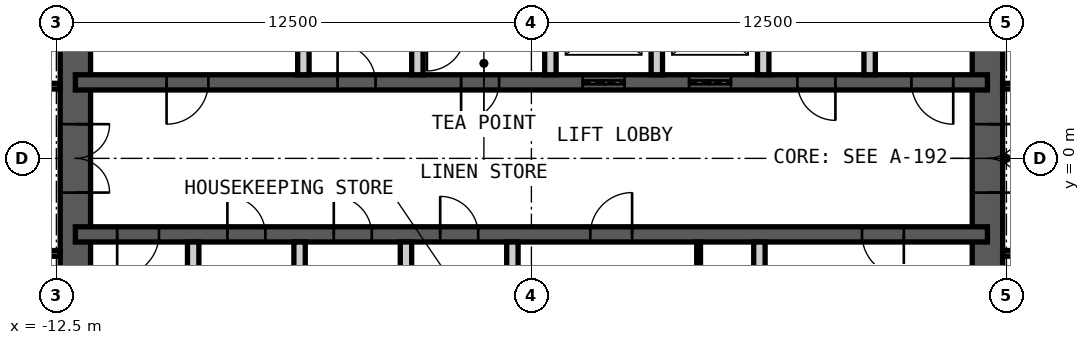
"""IFC4 building model, lengths in metres.
Left out: names, types, materials, properties, quantities, classifications, styles, units other than length and angle.
Written with IfcOpenShell. Run it as: python <this file> out.ifc"""

import sys

from ifc_helpers import new_model, si_unit, direction, frame, frame_2d, origin, place, context, subcontext, project, spatial, rectangle, extrude, element, fill, save


model = new_model("IFC4")
c1 = context("Model", 3, precision=1e-05, world=origin(), true_north=direction((0.0, 1.0)))
c2 = subcontext(c1, "Body", "Model", "MODEL_VIEW")
j1 = project(units=[si_unit("LENGTHUNIT", "METRE"), si_unit("PLANEANGLEUNIT", "RADIAN")], contexts=[c1])
p1 = place(None, origin())
s1 = spatial("IfcSite", under=j1, at=p1, CompositionType="ELEMENT")
p2 = place(p1, origin())
s2 = spatial("IfcBuilding", under=s1, at=p2, CompositionType="ELEMENT")
p3 = place(p2, frame((0.0, 0.0, 304.0)))
s3 = spatial("IfcBuildingStorey", under=s2, at=p3, CompositionType="ELEMENT", Elevation=304.0)
p4 = place(p3, frame((12.0, -9.0, 0.0), z_axis=(0.0, 0.0, 1.0), x_axis=(0.0, 1.0, 0.0)))
e1 = element("IfcWall", 1, at=p4, inside=s3, PredefinedType="SHEAR", context=c2, shape_type="SweptSolid", body=[
    extrude(rectangle(XDim=18.0, YDim=0.8, at=frame_2d((9.0, 0.0))), origin(), (0.0, 0.0, 1.0), 4.2),
])
p5 = place(p4, frame((8.1, 0.0, 0.0)))
e2 = element("IfcOpeningElement", 2, at=p5, cuts=e1, PredefinedType="OPENING", context=c2, shape_type="SweptSolid", body=[
    extrude(rectangle(XDim=1.8, YDim=2.1, at=frame_2d((0.9, 1.05))), frame((0.0, 0.41, 0.0), z_axis=(0.0, -1.0, 0.0), x_axis=(1.0, 0.0, 0.0)), (0.0, 0.0, 1.0), 0.82),
])
p6 = place(p3, frame((-12.0, -9.0, 0.0), z_axis=(0.0, 0.0, 1.0), x_axis=(0.0, 1.0, 0.0)))
e3 = element("IfcWall", 3, at=p6, inside=s3, PredefinedType="SHEAR", context=c2, shape_type="SweptSolid", body=[
    extrude(rectangle(XDim=18.0, YDim=0.8, at=frame_2d((9.0, 0.0))), origin(), (0.0, 0.0, 1.0), 4.2),
])
p7 = place(p6, frame((8.1, 0.0, 0.0)))
e4 = element("IfcOpeningElement", 4, at=p7, cuts=e3, PredefinedType="OPENING", context=c2, shape_type="SweptSolid", body=[
    extrude(rectangle(XDim=1.8, YDim=2.1, at=frame_2d((0.9, 1.05))), frame((0.0, 0.41, 0.0), z_axis=(0.0, -1.0, 0.0), x_axis=(1.0, 0.0, 0.0)), (0.0, 0.0, 1.0), 0.82),
])
p8 = place(p3, frame((-12.0, 2.0, 0.0), z_axis=(0.0, 0.0, 1.0), x_axis=(1.0, 0.0, 0.0)))
e5 = element("IfcWall", 5, at=p8, inside=s3, PredefinedType="SHEAR", context=c2, shape_type="SweptSolid", body=[
    extrude(rectangle(XDim=24.0, YDim=0.4, at=frame_2d((12.0, 0.0))), origin(), (0.0, 0.0, 1.0), 4.2),
])
p9 = place(p8, frame((2.4, 0.0, 0.0)))
e6 = element("IfcOpeningElement", 6, at=p9, cuts=e5, PredefinedType="OPENING", context=c2, shape_type="SweptSolid", body=[
    extrude(rectangle(XDim=1.1, YDim=2.1, at=frame_2d((0.55, 1.05))), frame((0.0, 0.21, 0.0), z_axis=(0.0, -1.0, 0.0), x_axis=(1.0, 0.0, 0.0)), (0.0, 0.0, 1.0), 0.42),
])
p10 = place(p8, frame((22.0, 0.0, 0.0)))
e7 = element("IfcOpeningElement", 7, at=p10, cuts=e5, PredefinedType="OPENING", context=c2, shape_type="SweptSolid", body=[
    extrude(rectangle(XDim=1.1, YDim=2.1, at=frame_2d((0.55, 1.05))), frame((0.0, 0.21, 0.0), z_axis=(0.0, -1.0, 0.0), x_axis=(1.0, 0.0, 0.0)), (0.0, 0.0, 1.0), 0.42),
])
p11 = place(p8, frame((10.15, 0.0, 0.0)))
e8 = element("IfcOpeningElement", 8, at=p11, cuts=e5, PredefinedType="OPENING", context=c2, shape_type="SweptSolid", body=[
    extrude(rectangle(XDim=1.0, YDim=2.1, at=frame_2d((0.5, 1.05))), frame((0.0, 0.21, 0.0), z_axis=(0.0, -1.0, 0.0), x_axis=(1.0, 0.0, 0.0)), (0.0, 0.0, 1.0), 0.42),
])
p12 = place(p8, frame((6.9, 0.0, 0.0)))
e9 = element("IfcOpeningElement", 9, at=p12, cuts=e5, PredefinedType="OPENING", context=c2, shape_type="SweptSolid", body=[
    extrude(rectangle(XDim=1.0, YDim=2.1, at=frame_2d((0.5, 1.05))), frame((0.0, 0.21, 0.0), z_axis=(0.0, -1.0, 0.0), x_axis=(1.0, 0.0, 0.0)), (0.0, 0.0, 1.0), 0.42),
])
p13 = place(p8, frame((13.35, 0.0, 0.0)))
e10 = element("IfcOpeningElement", 10, at=p13, cuts=e5, PredefinedType="OPENING", context=c2, shape_type="SweptSolid", body=[
    extrude(rectangle(XDim=1.1, YDim=2.4, at=frame_2d((0.55, 1.2))), frame((0.0, 0.21, 0.0), z_axis=(0.0, -1.0, 0.0), x_axis=(1.0, 0.0, 0.0)), (0.0, 0.0, 1.0), 0.42),
])
p14 = place(p8, frame((16.15, 0.0, 0.0)))
e11 = element("IfcOpeningElement", 11, at=p14, cuts=e5, PredefinedType="OPENING", context=c2, shape_type="SweptSolid", body=[
    extrude(rectangle(XDim=1.1, YDim=2.4, at=frame_2d((0.55, 1.2))), frame((0.0, 0.21, 0.0), z_axis=(0.0, -1.0, 0.0), x_axis=(1.0, 0.0, 0.0)), (0.0, 0.0, 1.0), 0.42),
])
p15 = place(p8, frame((19.0, 0.0, 0.0)))
e12 = element("IfcOpeningElement", 12, at=p15, cuts=e5, PredefinedType="OPENING", context=c2, shape_type="SweptSolid", body=[
    extrude(rectangle(XDim=1.0, YDim=2.1, at=frame_2d((0.5, 1.05))), frame((0.0, 0.21, 0.0), z_axis=(0.0, -1.0, 0.0), x_axis=(1.0, 0.0, 0.0)), (0.0, 0.0, 1.0), 0.42),
])
p16 = place(p3, frame((-12.0, -2.0, 0.0), z_axis=(0.0, 0.0, 1.0), x_axis=(1.0, 0.0, 0.0)))
e13 = element("IfcWall", 13, at=p16, inside=s3, PredefinedType="SHEAR", context=c2, shape_type="SweptSolid", body=[
    extrude(rectangle(XDim=24.0, YDim=0.4, at=frame_2d((12.0, 0.0))), origin(), (0.0, 0.0, 1.0), 4.2),
])
p17 = place(p16, frame((1.1, 0.0, 0.0)))
e14 = element("IfcOpeningElement", 14, at=p17, cuts=e13, PredefinedType="OPENING", context=c2, shape_type="SweptSolid", body=[
    extrude(rectangle(XDim=1.1, YDim=2.1, at=frame_2d((0.55, 1.05))), frame((0.0, 0.21, 0.0), z_axis=(0.0, -1.0, 0.0), x_axis=(1.0, 0.0, 0.0)), (0.0, 0.0, 1.0), 0.42),
])
p18 = place(p16, frame((13.55, 0.0, 0.0)))
e15 = element("IfcOpeningElement", 15, at=p18, cuts=e13, PredefinedType="OPENING", context=c2, shape_type="SweptSolid", body=[
    extrude(rectangle(XDim=1.1, YDim=2.1, at=frame_2d((0.55, 1.05))), frame((0.0, 0.21, 0.0), z_axis=(0.0, -1.0, 0.0), x_axis=(1.0, 0.0, 0.0)), (0.0, 0.0, 1.0), 0.42),
])
p19 = place(p16, frame((20.7, 0.0, 0.0)))
e16 = element("IfcOpeningElement", 16, at=p19, cuts=e13, PredefinedType="OPENING", context=c2, shape_type="SweptSolid", body=[
    extrude(rectangle(XDim=1.1, YDim=2.1, at=frame_2d((0.55, 1.05))), frame((0.0, 0.21, 0.0), z_axis=(0.0, -1.0, 0.0), x_axis=(1.0, 0.0, 0.0)), (0.0, 0.0, 1.0), 0.42),
])
p20 = place(p16, frame((4.0, 0.0, 0.0)))
e17 = element("IfcOpeningElement", 17, at=p20, cuts=e13, PredefinedType="OPENING", context=c2, shape_type="SweptSolid", body=[
    extrude(rectangle(XDim=1.0, YDim=2.1, at=frame_2d((0.5, 1.05))), frame((0.0, 0.21, 0.0), z_axis=(0.0, -1.0, 0.0), x_axis=(1.0, 0.0, 0.0)), (0.0, 0.0, 1.0), 0.42),
])
p21 = place(p16, frame((6.8, 0.0, 0.0)))
e18 = element("IfcOpeningElement", 18, at=p21, cuts=e13, PredefinedType="OPENING", context=c2, shape_type="SweptSolid", body=[
    extrude(rectangle(XDim=1.0, YDim=2.1, at=frame_2d((0.5, 1.05))), frame((0.0, 0.21, 0.0), z_axis=(0.0, -1.0, 0.0), x_axis=(1.0, 0.0, 0.0)), (0.0, 0.0, 1.0), 0.42),
])
p22 = place(p16, frame((9.6, 0.0, 0.0)))
e19 = element("IfcOpeningElement", 19, at=p22, cuts=e13, PredefinedType="OPENING", context=c2, shape_type="SweptSolid", body=[
    extrude(rectangle(XDim=1.0, YDim=2.1, at=frame_2d((0.5, 1.05))), frame((0.0, 0.21, 0.0), z_axis=(0.0, -1.0, 0.0), x_axis=(1.0, 0.0, 0.0)), (0.0, 0.0, 1.0), 0.42),
])
for number, where, z_axis, x_axis in (
    (20, (-6.0, 2.2, 0.0), (0.0, 0.0, 1.0), (0.0, 1.0, 0.0)),
    (21, (-3.0, 2.2, 0.0), (0.0, 0.0, 1.0), (0.0, 1.0, 0.0)),
    (22, (0.5, 2.2, 0.0), (0.0, 0.0, 1.0), (0.0, 1.0, 0.0)),
    (23, (3.3, 2.2, 0.0), (0.0, 0.0, 1.0), (0.0, 1.0, 0.0)),
    (24, (6.1, 2.2, 0.0), (0.0, 0.0, 1.0), (0.0, 1.0, 0.0)),
    (25, (8.9, 2.2, 0.0), (0.0, 0.0, 1.0), (0.0, 1.0, 0.0)),
    (26, (-8.9, -4.85, 0.0), (0.0, 0.0, 1.0), (0.0, 1.0, 0.0)),
    (27, (-6.1, -4.85, 0.0), (0.0, 0.0, 1.0), (0.0, 1.0, 0.0)),
    (28, (-3.3, -4.85, 0.0), (0.0, 0.0, 1.0), (0.0, 1.0, 0.0)),
    (29, (-0.5, -4.85, 0.0), (0.0, 0.0, 1.0), (0.0, 1.0, 0.0)),
    (30, (6.0, -4.85, 0.0), (0.0, 0.0, 1.0), (0.0, 1.0, 0.0)),
):
    element("IfcWall", number, at=place(p3, frame(where, z_axis=z_axis, x_axis=x_axis)), inside=s3, PredefinedType="PARTITIONING", context=c2, shape_type="SweptSolid", body=[
        extrude(rectangle(XDim=2.65, YDim=0.3, at=frame_2d((1.325, 0.0))), origin(), (0.0, 0.0, 1.0), 3.98),
    ])
p23 = place(p3, frame((4.4, -4.85, 0.0), z_axis=(0.0, 0.0, 1.0), x_axis=(0.0, 1.0, 0.0)))
e31 = element("IfcWall", 31, at=p23, inside=s3, PredefinedType="PARTITIONING", context=c2, shape_type="SweptSolid", body=[
    extrude(rectangle(XDim=2.65, YDim=0.1, at=frame_2d((1.325, 0.0))), origin(), (0.0, 0.0, 1.0), 3.98),
])
p24 = place(p23, frame((0.1, 0.0, 0.0)))
e32 = element("IfcOpeningElement", 32, at=p24, cuts=e31, PredefinedType="OPENING", context=c2, shape_type="SweptSolid", body=[
    extrude(rectangle(XDim=1.0, YDim=2.4, at=frame_2d((0.5, 1.2))), frame((0.0, 0.06, 0.0), z_axis=(0.0, -1.0, 0.0), x_axis=(1.0, 0.0, 0.0)), (0.0, 0.0, 1.0), 0.12),
])
p25 = place(p3, frame((12.4, 1.9, 0.0), z_axis=(0.0, 0.0, 1.0), x_axis=(1.0, 0.0, 0.0)))
e33 = element("IfcWall", 33, at=p25, inside=s3, PredefinedType="PARTITIONING", context=c2, shape_type="SweptSolid", body=[
    extrude(rectangle(XDim=2.1, YDim=0.15, at=frame_2d((1.05, 0.0))), origin(), (0.0, 0.0, 1.0), 2.93),
])
p26 = place(p3, frame((12.4, -2.5, 0.0), z_axis=(0.0, 0.0, 1.0), x_axis=(1.0, 0.0, 0.0)))
e34 = element("IfcWall", 34, at=p26, inside=s3, PredefinedType="PARTITIONING", context=c2, shape_type="SweptSolid", body=[
    extrude(rectangle(XDim=2.1, YDim=0.15, at=frame_2d((1.05, 0.0))), origin(), (0.0, 0.0, 1.0), 3.33),
])
for number, where, z_axis, x_axis in (
    (35, (-12.4, 1.9, 0.0), (0.0, 0.0, 1.0), (-1.0, 0.0, 0.0)),
    (36, (-12.4, -2.5, 0.0), (0.0, 0.0, 1.0), (-1.0, 0.0, 0.0)),
):
    element("IfcWall", number, at=place(p3, frame(where, z_axis=z_axis, x_axis=x_axis)), inside=s3, PredefinedType="PARTITIONING", context=c2, shape_type="SweptSolid", body=[
        extrude(rectangle(XDim=2.1, YDim=0.15, at=frame_2d((1.05, 0.0))), origin(), (0.0, 0.0, 1.0), 3.53),
    ])
p27 = place(p9, origin())
e37 = element("IfcDoor", 37, at=p27, inside=s3, OperationType="SINGLE_SWING_LEFT", PredefinedType="DOOR", context=c2, shape_type="SweptSolid", body=[
    extrude(rectangle(XDim=1.1, YDim=2.1, at=frame_2d((0.55, 1.05))), frame((0.0, 0.025, 0.0), z_axis=(0.0, -1.0, 0.0), x_axis=(1.0, 0.0, 0.0)), (0.0, 0.0, 1.0), 0.05),
])
fill(e6, e37)
p28 = place(p17, origin())
e38 = element("IfcDoor", 38, at=p28, inside=s3, OperationType="SINGLE_SWING_LEFT", PredefinedType="DOOR", context=c2, shape_type="SweptSolid", body=[
    extrude(rectangle(XDim=1.1, YDim=2.1, at=frame_2d((0.55, 1.05))), frame((0.0, 0.025, 0.0), z_axis=(0.0, -1.0, 0.0), x_axis=(1.0, 0.0, 0.0)), (0.0, 0.0, 1.0), 0.05),
])
fill(e14, e38)
p29 = place(p10, origin())
e39 = element("IfcDoor", 39, at=p29, inside=s3, OperationType="SINGLE_SWING_RIGHT", PredefinedType="DOOR", context=c2, shape_type="SweptSolid", body=[
    extrude(rectangle(XDim=1.1, YDim=2.1, at=frame_2d((0.55, 1.05))), frame((0.0, 0.025, 0.0), z_axis=(0.0, -1.0, 0.0), x_axis=(1.0, 0.0, 0.0)), (0.0, 0.0, 1.0), 0.05),
])
fill(e7, e39)
p30 = place(p11, origin())
e40 = element("IfcDoor", 40, at=p30, inside=s3, OperationType="SINGLE_SWING_LEFT", PredefinedType="DOOR", context=c2, shape_type="SweptSolid", body=[
    extrude(rectangle(XDim=1.0, YDim=2.1, at=frame_2d((0.5, 1.05))), frame((0.0, 0.025, 0.0), z_axis=(0.0, -1.0, 0.0), x_axis=(1.0, 0.0, 0.0)), (0.0, 0.0, 1.0), 0.05),
])
fill(e8, e40)
p31 = place(p18, origin())
e41 = element("IfcDoor", 41, at=p31, inside=s3, OperationType="SINGLE_SWING_LEFT", PredefinedType="DOOR", context=c2, shape_type="SweptSolid", body=[
    extrude(rectangle(XDim=1.1, YDim=2.1, at=frame_2d((0.55, 1.05))), frame((0.0, 0.025, 0.0), z_axis=(0.0, -1.0, 0.0), x_axis=(1.0, 0.0, 0.0)), (0.0, 0.0, 1.0), 0.05),
])
fill(e15, e41)
p32 = place(p19, origin())
e42 = element("IfcDoor", 42, at=p32, inside=s3, OperationType="SINGLE_SWING_RIGHT", PredefinedType="DOOR", context=c2, shape_type="SweptSolid", body=[
    extrude(rectangle(XDim=1.1, YDim=2.1, at=frame_2d((0.55, 1.05))), frame((0.0, 0.025, 0.0), z_axis=(0.0, -1.0, 0.0), x_axis=(1.0, 0.0, 0.0)), (0.0, 0.0, 1.0), 0.05),
])
fill(e16, e42)
p33 = place(p5, origin())
e43 = element("IfcDoor", 43, at=p33, inside=s3, OperationType="DOUBLE_DOOR_DOUBLE_SWING", PredefinedType="DOOR", context=c2, shape_type="SweptSolid", body=[
    extrude(rectangle(XDim=1.8, YDim=2.1, at=frame_2d((0.9, 1.05))), frame((0.0, 0.025, 0.0), z_axis=(0.0, -1.0, 0.0), x_axis=(1.0, 0.0, 0.0)), (0.0, 0.0, 1.0), 0.05),
])
fill(e2, e43)
p34 = place(p7, origin())
e44 = element("IfcDoor", 44, at=p34, inside=s3, OperationType="DOUBLE_DOOR_DOUBLE_SWING", PredefinedType="DOOR", context=c2, shape_type="SweptSolid", body=[
    extrude(rectangle(XDim=1.8, YDim=2.1, at=frame_2d((0.9, 1.05))), frame((0.0, 0.025, 0.0), z_axis=(0.0, -1.0, 0.0), x_axis=(1.0, 0.0, 0.0)), (0.0, 0.0, 1.0), 0.05),
])
fill(e4, e44)
p35 = place(p12, origin())
e45 = element("IfcDoor", 45, at=p35, inside=s3, OperationType="SINGLE_SWING_RIGHT", PredefinedType="DOOR", context=c2, shape_type="SweptSolid", body=[
    extrude(rectangle(XDim=1.0, YDim=2.1, at=frame_2d((0.5, 1.05))), frame((0.0, 0.025, 0.0), z_axis=(0.0, -1.0, 0.0), x_axis=(1.0, 0.0, 0.0)), (0.0, 0.0, 1.0), 0.05),
])
fill(e9, e45)
p36 = place(p13, origin())
e46 = element("IfcDoor", 46, at=p36, inside=s3, OperationType="DOUBLE_DOOR_SLIDING", PredefinedType="DOOR", context=c2, shape_type="SweptSolid", body=[
    extrude(rectangle(XDim=1.1, YDim=2.4, at=frame_2d((0.55, 1.2))), frame((0.0, 0.025, 0.0), z_axis=(0.0, -1.0, 0.0), x_axis=(1.0, 0.0, 0.0)), (0.0, 0.0, 1.0), 0.05),
])
fill(e10, e46)
p37 = place(p14, origin())
e47 = element("IfcDoor", 47, at=p37, inside=s3, OperationType="DOUBLE_DOOR_SLIDING", PredefinedType="DOOR", context=c2, shape_type="SweptSolid", body=[
    extrude(rectangle(XDim=1.1, YDim=2.4, at=frame_2d((0.55, 1.2))), frame((0.0, 0.025, 0.0), z_axis=(0.0, -1.0, 0.0), x_axis=(1.0, 0.0, 0.0)), (0.0, 0.0, 1.0), 0.05),
])
fill(e11, e47)
p38 = place(p15, origin())
e48 = element("IfcDoor", 48, at=p38, inside=s3, OperationType="SINGLE_SWING_RIGHT", PredefinedType="DOOR", context=c2, shape_type="SweptSolid", body=[
    extrude(rectangle(XDim=1.0, YDim=2.1, at=frame_2d((0.5, 1.05))), frame((0.0, 0.025, 0.0), z_axis=(0.0, -1.0, 0.0), x_axis=(1.0, 0.0, 0.0)), (0.0, 0.0, 1.0), 0.05),
])
fill(e12, e48)
p39 = place(p20, origin())
e49 = element("IfcDoor", 49, at=p39, inside=s3, OperationType="SINGLE_SWING_RIGHT", PredefinedType="DOOR", context=c2, shape_type="SweptSolid", body=[
    extrude(rectangle(XDim=1.0, YDim=2.1, at=frame_2d((0.5, 1.05))), frame((0.0, 0.025, 0.0), z_axis=(0.0, -1.0, 0.0), x_axis=(1.0, 0.0, 0.0)), (0.0, 0.0, 1.0), 0.05),
])
fill(e17, e49)
p40 = place(p21, origin())
e50 = element("IfcDoor", 50, at=p40, inside=s3, OperationType="SINGLE_SWING_RIGHT", PredefinedType="DOOR", context=c2, shape_type="SweptSolid", body=[
    extrude(rectangle(XDim=1.0, YDim=2.1, at=frame_2d((0.5, 1.05))), frame((0.0, 0.025, 0.0), z_axis=(0.0, -1.0, 0.0), x_axis=(1.0, 0.0, 0.0)), (0.0, 0.0, 1.0), 0.05),
])
fill(e18, e50)
p41 = place(p22, origin())
e51 = element("IfcDoor", 51, at=p41, inside=s3, OperationType="SINGLE_SWING_RIGHT", PredefinedType="DOOR", context=c2, shape_type="SweptSolid", body=[
    extrude(rectangle(XDim=1.0, YDim=2.1, at=frame_2d((0.5, 1.05))), frame((0.0, 0.025, 0.0), z_axis=(0.0, -1.0, 0.0), x_axis=(1.0, 0.0, 0.0)), (0.0, 0.0, 1.0), 0.05),
])
fill(e19, e51)
save(model, sys.argv[1])
